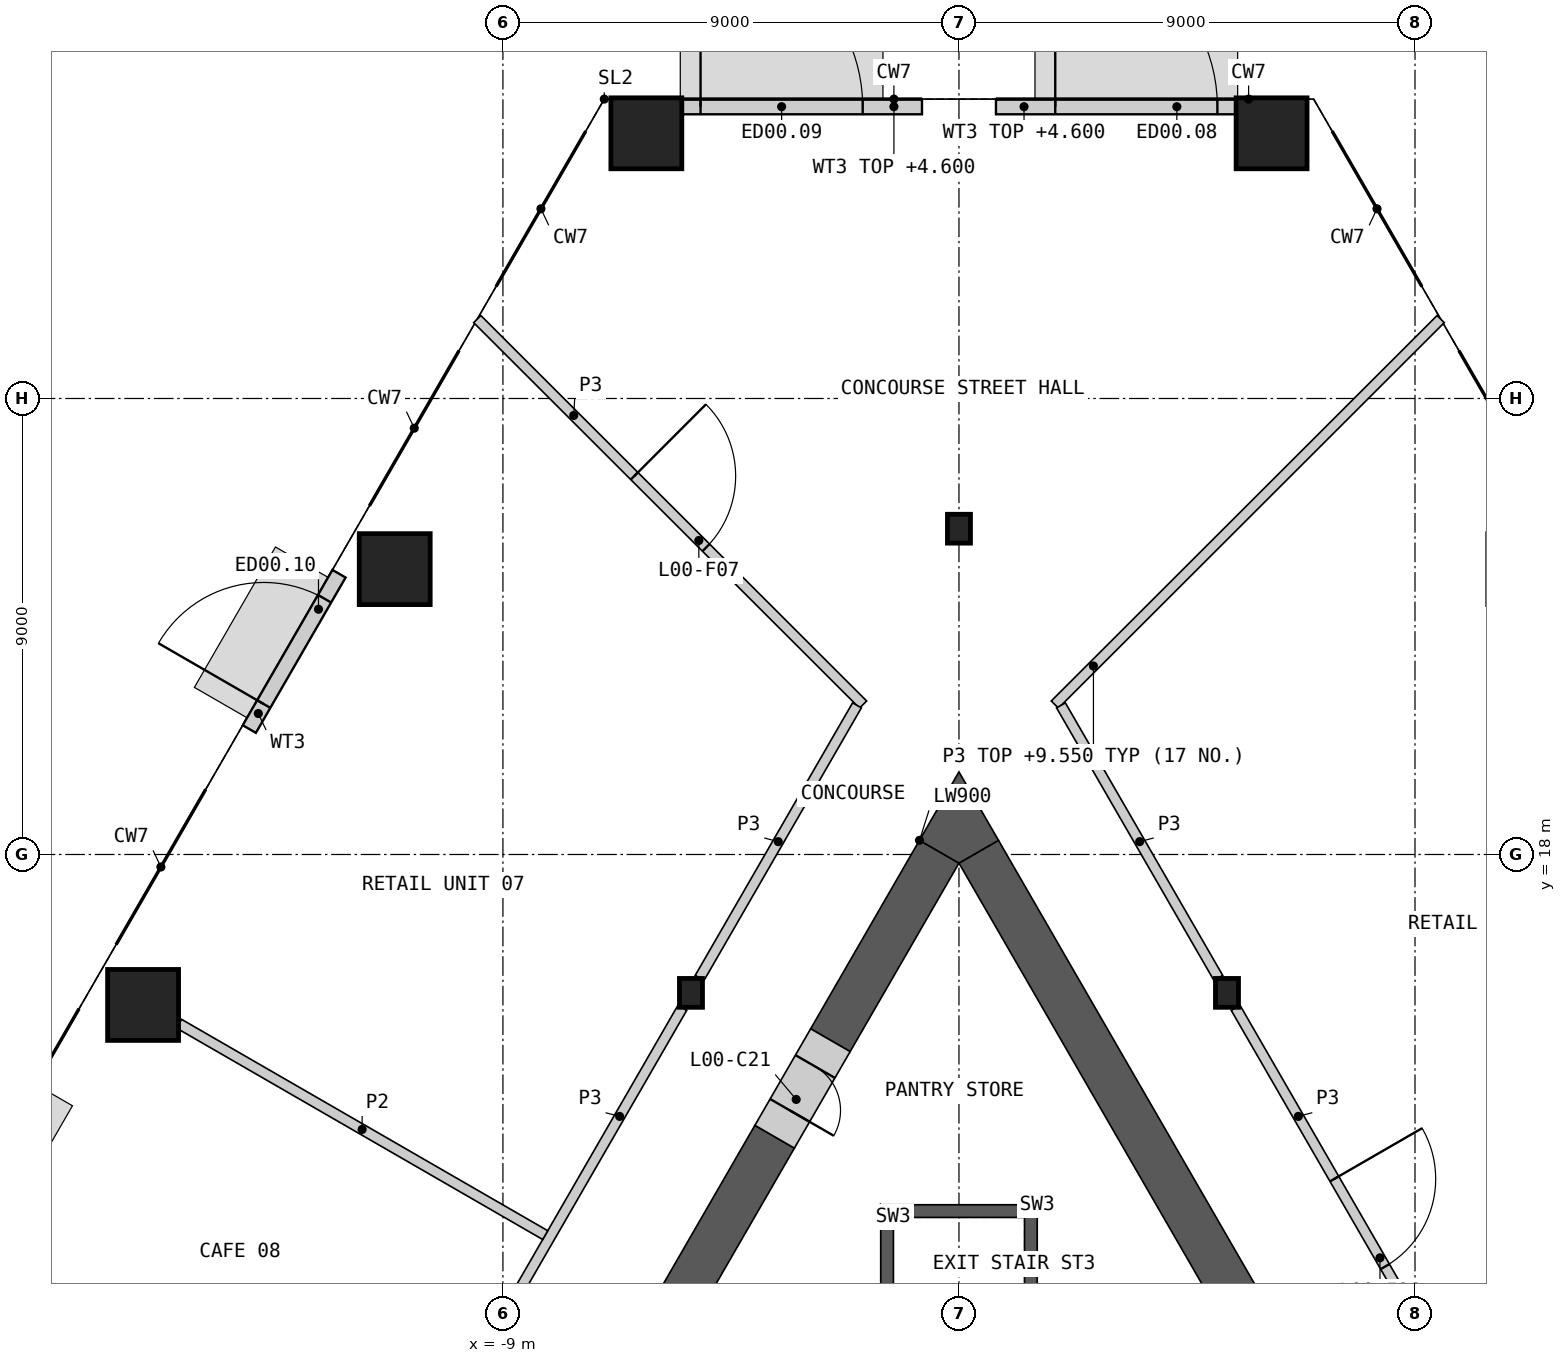
"""IFC4 building model, lengths in metres.
Left out: names, types, materials, properties, quantities, classifications, styles, units other than length and angle.
Written with IfcOpenShell. Run it as: python <this file> out.ifc"""

import sys

from ifc_helpers import new_model, si_unit, direction, frame, frame_2d, origin, origin_2d, place, context, subcontext, project, spatial, polyline, rectangle, hollow_rectangle, i_section, outline, extrude, element, fill, save


model = new_model("IFC4")
c1 = context("Model", 3, precision=1e-05, world=origin(), true_north=direction((0.0, 1.0)))
c2 = subcontext(c1, "Body", "Model", "MODEL_VIEW")
j1 = project(units=[si_unit("LENGTHUNIT", "METRE"), si_unit("PLANEANGLEUNIT", "RADIAN")], contexts=[c1])
p1 = place(None, origin())
s1 = spatial("IfcSite", under=j1, at=p1, CompositionType="ELEMENT")
p2 = place(p1, origin())
s2 = spatial("IfcBuilding", under=s1, at=p2, CompositionType="ELEMENT")
p3 = place(p2, origin())
s3 = spatial("IfcBuildingStorey", under=s2, at=p3, CompositionType="ELEMENT", Elevation=0.0)
for number, where, z_axis, x_axis in (
    (1, (6.17, 32.234, 0.0), (0.0, 0.0, 1.0), (1.0, 0.0, 0.0)),
    (2, (-6.17, 32.234, 0.0), (0.0, 0.0, 1.0), (1.0, 0.0, 0.0)),
    (3, (-11.136, 23.632, 0.0), (0.0, 0.0, 1.0), (1.0, 0.0, 0.0)),
    (4, (-16.102, 15.031, 0.0), (0.0, 0.0, 1.0), (1.0, 0.0, 0.0)),
):
    element("IfcColumn", number, at=place(p3, frame(where, z_axis=z_axis, x_axis=x_axis)), inside=s3, PredefinedType="COLUMN", context=c2, shape_type="SweptSolid", body=[
        extrude(hollow_rectangle(XDim=1.4, YDim=1.4, WallThickness=0.1, at=origin_2d()), origin(), (0.0, 0.0, 1.0), 10.0),
    ])
for number, where, z_axis, x_axis in (
    (5, (0.0, 24.43, 0.0), (0.0, 0.0, 1.0), (1.0, 0.0, 0.0)),
    (6, (-5.289, 15.269, 0.0), (0.0, 0.0, 1.0), (1.0, 0.0, 0.0)),
    (7, (5.289, 15.269, 0.0), (0.0, 0.0, 1.0), (1.0, 0.0, 0.0)),
):
    element("IfcColumn", number, at=place(p3, frame(where, z_axis=z_axis, x_axis=x_axis)), inside=s3, PredefinedType="COLUMN", context=c2, shape_type="SweptSolid", body=[
        extrude(i_section(OverallWidth=0.454, OverallDepth=0.57, WebThickness=0.078, FlangeThickness=0.125, at=origin_2d()), origin(), (0.0, 0.0, 1.0), 10.0),
    ])
p4 = place(p3, frame((0.73, 32.759, 0.0), z_axis=(0.0, 0.0, 1.0), x_axis=(1.0, 0.0, 0.0)))
e8 = element("IfcWall", 8, at=p4, inside=s3, PredefinedType="SOLIDWALL", context=c2, shape_type="SweptSolid", body=[
    extrude(rectangle(XDim=5.54, YDim=0.3, at=frame_2d((2.77, 0.0))), origin(), (0.0, 0.0, 1.0), 4.6),
])
p5 = place(p4, frame((1.17, 0.0, 0.0)))
e9 = element("IfcOpeningElement", 9, at=p5, cuts=e8, PredefinedType="OPENING", context=c2, shape_type="SweptSolid", body=[
    extrude(rectangle(XDim=3.2, YDim=4.0, at=frame_2d((1.6, 2.0))), frame((0.0, 0.16, 0.0), z_axis=(0.0, -1.0, 0.0), x_axis=(1.0, 0.0, 0.0)), (0.0, 0.0, 1.0), 0.32),
])
p6 = place(p3, frame((-6.27, 32.759, 0.0), z_axis=(0.0, 0.0, 1.0), x_axis=(1.0, 0.0, 0.0)))
e10 = element("IfcWall", 10, at=p6, inside=s3, PredefinedType="SOLIDWALL", context=c2, shape_type="SweptSolid", body=[
    extrude(rectangle(XDim=5.54, YDim=0.3, at=frame_2d((2.77, 0.0))), origin(), (0.0, 0.0, 1.0), 4.6),
])
p7 = place(p6, frame((1.17, 0.0, 0.0)))
e11 = element("IfcOpeningElement", 11, at=p7, cuts=e10, PredefinedType="OPENING", context=c2, shape_type="SweptSolid", body=[
    extrude(rectangle(XDim=3.2, YDim=4.0, at=frame_2d((1.6, 2.0))), frame((0.0, 0.16, 0.0), z_axis=(0.0, -1.0, 0.0), x_axis=(1.0, 0.0, 0.0)), (0.0, 0.0, 1.0), 0.32),
])
p8 = place(p3, frame((-14.005, 20.476, 0.0), z_axis=(0.0, 0.0, 1.0), x_axis=(0.500011000363, 0.866019052629, 0.0)))
e12 = element("IfcWall", 12, at=p8, inside=s3, PredefinedType="SOLIDWALL", context=c2, shape_type="SweptSolid", body=[
    extrude(rectangle(XDim=3.54, YDim=0.3, at=frame_2d((1.77, 0.0))), origin(), (0.0, 0.0, 1.0), 9.55),
])
p9 = place(p8, frame((0.57, 0.0, 0.0)))
e13 = element("IfcOpeningElement", 13, at=p9, cuts=e12, PredefinedType="OPENING", context=c2, shape_type="SweptSolid", body=[
    extrude(rectangle(XDim=2.4, YDim=3.6, at=frame_2d((1.2, 1.8))), frame((0.0, 0.16, 0.0), z_axis=(0.0, -1.0, 0.0), x_axis=(1.0, 0.0, 0.0)), (0.0, 0.0, 1.0), 0.32),
])
p10 = place(p3, origin())
e14 = element("IfcWall", 14, at=p10, inside=s3, PredefinedType="SHEAR", context=c2, shape_type="SweptSolid", body=[
    extrude(outline(polyline([(1.544, 5.237), (1.544, 11.087), (1.294, 10.837), (1.294, 5.237), (1.544, 5.237)])), origin(), (0.0, 0.0, 1.0), 9.55),
])
p11 = place(p3, origin())
e15 = element("IfcWall", 15, at=p11, inside=s3, PredefinedType="SHEAR", context=c2, shape_type="SweptSolid", body=[
    extrude(outline(polyline([(1.544, 11.087), (-1.544, 11.087), (-1.294, 10.837), (1.294, 10.837), (1.544, 11.087)])), origin(), (0.0, 0.0, 1.0), 9.55),
])
p12 = place(p3, origin())
e16 = element("IfcWall", 16, at=p12, inside=s3, PredefinedType="SHEAR", context=c2, shape_type="SweptSolid", body=[
    extrude(outline(polyline([(-1.294, 10.837), (-1.544, 11.087), (-1.544, 5.237), (-1.294, 5.237), (-1.294, 10.837)])), origin(), (0.0, 0.0, 1.0), 9.55),
])
p13 = place(p3, frame((5.91, 8.493, 0.0), z_axis=(0.0, 0.0, 1.0), x_axis=(-0.50000828114, 0.866020622613, 0.0)))
e17 = element("IfcWall", 17, at=p13, inside=s3, PredefinedType="SHEAR", context=c2, shape_type="SweptSolid", body=[
    extrude(rectangle(XDim=11.041, YDim=0.9, at=frame_2d((5.521, 0.0))), origin(), (0.0, 0.0, 1.0), 9.55),
])
p14 = place(p3, frame((-3.637, 12.43, 0.0), z_axis=(0.0, 0.0, 1.0), x_axis=(-0.500011513458, -0.866018756384, 0.0)))
e18 = element("IfcWall", 18, at=p14, inside=s3, PredefinedType="SHEAR", context=c2, shape_type="SweptSolid", body=[
    extrude(rectangle(XDim=9.066, YDim=0.9, at=frame_2d((4.533, 0.0))), origin(), (0.0, 0.0, 1.0), 9.55),
])
p15 = place(p3, frame((-0.39, 18.055, 0.0), z_axis=(0.0, 0.0, 1.0), x_axis=(-0.500014347272, -0.866017120224, 0.0)))
e19 = element("IfcWall", 19, at=p15, inside=s3, PredefinedType="SHEAR", context=c2, shape_type="SweptSolid", body=[
    extrude(rectangle(XDim=4.296, YDim=0.9, at=frame_2d((2.148, 0.0))), origin(), (0.0, 0.0, 1.0), 9.55),
])
p16 = place(p3, origin())
e20 = element("IfcWall", 20, at=p16, inside=s3, PredefinedType="SHEAR", context=c2, shape_type="SweptSolid", body=[
    extrude(outline(polyline([(-0.779, 18.28), (0.0, 19.63), (0.779, 18.28), (0.0, 17.83), (-0.779, 18.28)])), origin(), (0.0, 0.0, 1.0), 9.55),
])
p17 = place(p3, frame((-2.538, 14.335, 0.0), z_axis=(0.0, 0.0, 1.0), x_axis=(-0.499994660107, -0.866028486751, 0.0)))
e21 = element("IfcWall", 21, at=p17, inside=s3, PredefinedType="SHEAR", context=c2, shape_type="SweptSolid", body=[
    extrude(rectangle(XDim=2.2, YDim=0.9, at=frame_2d((1.1, 0.0))), origin(), (0.0, 0.0, 1.0), 9.55),
])
p18 = place(p17, frame((0.6, 0.0, 0.0)))
e22 = element("IfcOpeningElement", 22, at=p18, cuts=e21, PredefinedType="OPENING", context=c2, shape_type="SweptSolid", body=[
    extrude(rectangle(XDim=1.0, YDim=2.1, at=frame_2d((0.5, 1.05))), frame((0.0, 0.46, 0.0), z_axis=(0.0, -1.0, 0.0), x_axis=(1.0, 0.0, 0.0)), (0.0, 0.0, 1.0), 0.92),
])
p19 = place(p3, frame((1.892, 20.959, 0.0), z_axis=(0.0, 0.0, 1.0), x_axis=(0.707390242945, 0.706823205749, 0.0)))
e23 = element("IfcWall", 23, at=p19, inside=s3, PredefinedType="PARTITIONING", context=c2, shape_type="SweptSolid", body=[
    extrude(rectangle(XDim=10.764, YDim=0.2, at=frame_2d((5.382, 0.0))), origin(), (0.0, 0.0, 1.0), 9.55),
])
p20 = place(p3, frame((-9.507, 28.567, 0.0), z_axis=(0.0, 0.0, 1.0), x_axis=(0.707390242945, -0.706823205749, 0.0)))
e24 = element("IfcWall", 24, at=p20, inside=s3, PredefinedType="PARTITIONING", context=c2, shape_type="SweptSolid", body=[
    extrude(rectangle(XDim=10.764, YDim=0.2, at=frame_2d((5.382, 0.0))), origin(), (0.0, 0.0, 1.0), 9.55),
])
p21 = place(p20, frame((4.382, 0.0, 0.0)))
e25 = element("IfcOpeningElement", 25, at=p21, cuts=e24, PredefinedType="OPENING", context=c2, shape_type="SweptSolid", body=[
    extrude(rectangle(XDim=2.0, YDim=2.1, at=frame_2d((1.0, 1.05))), frame((0.0, 0.11, 0.0), z_axis=(0.0, -1.0, 0.0), x_axis=(1.0, 0.0, 0.0)), (0.0, 0.0, 1.0), 0.22),
])
p22 = place(p3, frame((5.459, 14.974, 0.0), z_axis=(0.0, 0.0, 1.0), x_axis=(0.499985793049, -0.866033606016, 0.0)))
e26 = element("IfcWall", 26, at=p22, inside=s3, PredefinedType="PARTITIONING", context=c2, shape_type="SweptSolid", body=[
    extrude(rectangle(XDim=9.898, YDim=0.2, at=frame_2d((4.949, 0.0))), origin(), (0.0, 0.0, 1.0), 9.55),
])
p23 = place(p22, frame((3.898, 0.0, 0.0)))
e27 = element("IfcOpeningElement", 27, at=p23, cuts=e26, PredefinedType="OPENING", context=c2, shape_type="SweptSolid", body=[
    extrude(rectangle(XDim=2.0, YDim=2.1, at=frame_2d((1.0, 1.05))), frame((0.0, 0.11, 0.0), z_axis=(0.0, -1.0, 0.0), x_axis=(1.0, 0.0, 0.0)), (0.0, 0.0, 1.0), 0.22),
])
p24 = place(p3, frame((-10.408, 6.402, 0.0), z_axis=(0.0, 0.0, 1.0), x_axis=(0.499985793049, 0.866033606016, 0.0)))
e28 = element("IfcWall", 28, at=p24, inside=s3, PredefinedType="PARTITIONING", context=c2, shape_type="SweptSolid", body=[
    extrude(rectangle(XDim=9.898, YDim=0.2, at=frame_2d((4.949, 0.0))), origin(), (0.0, 0.0, 1.0), 9.55),
])
p25 = place(p24, frame((1.869, 0.0, 0.0)))
e29 = element("IfcOpeningElement", 29, at=p25, cuts=e28, PredefinedType="OPENING", context=c2, shape_type="SweptSolid", body=[
    extrude(rectangle(XDim=1.0, YDim=2.1, at=frame_2d((0.5, 1.05))), frame((0.0, 0.11, 0.0), z_axis=(0.0, -1.0, 0.0), x_axis=(1.0, 0.0, 0.0)), (0.0, 0.0, 1.0), 0.22),
])
for number, where, z_axis, x_axis in (
    (30, (-5.119, 15.563, 0.0), (0.0, 0.0, 1.0), (0.5, 0.866, 0.0)),
    (31, (2.013, 20.943, 0.0), (0.0, 0.0, 1.0), (0.5, -0.866, 0.0)),
):
    element("IfcWall", number, at=place(p3, frame(where, z_axis=z_axis, x_axis=x_axis)), inside=s3, PredefinedType="PARTITIONING", context=c2, shape_type="SweptSolid", body=[
        extrude(rectangle(XDim=6.212, YDim=0.2, at=frame_2d((3.106, 0.0))), origin(), (0.0, 0.0, 1.0), 9.55),
    ])
p26 = place(p3, frame((-15.392, 14.66, 0.0), z_axis=(0.0, 0.0, 1.0), x_axis=(0.866027244746, -0.499996811348, 0.0)))
e32 = element("IfcWall", 32, at=p26, inside=s3, PredefinedType="PARTITIONING", context=c2, shape_type="SweptSolid", body=[
    extrude(rectangle(XDim=8.345, YDim=0.2, at=frame_2d((4.172, 0.0))), origin(), (0.0, 0.0, 1.0), 9.55),
])
p27 = place(p3, frame((-20.109, 9.763, 0.0), z_axis=(0.0, 0.0, 1.0), x_axis=(0.866017364883, -0.500013923527, 0.0)))
e33 = element("IfcWall", 33, at=p27, inside=s3, PredefinedType="PARTITIONING", context=c2, shape_type="SweptSolid", body=[
    extrude(rectangle(XDim=9.982, YDim=0.2, at=frame_2d((4.991, 0.0))), origin(), (0.0, 0.0, 1.0), 9.55),
])
p28 = place(p5, origin())
e34 = element("IfcDoor", 34, at=p28, inside=s3, OperationType="DOUBLE_DOOR_DOUBLE_SWING", PredefinedType="DOOR", context=c2, shape_type="SweptSolid", body=[
    extrude(rectangle(XDim=3.2, YDim=4.0, at=frame_2d((1.6, 2.0))), frame((0.0, 0.025, 0.0), z_axis=(0.0, -1.0, 0.0), x_axis=(1.0, 0.0, 0.0)), (0.0, 0.0, 1.0), 0.05),
])
fill(e9, e34)
p29 = place(p7, origin())
e35 = element("IfcDoor", 35, at=p29, inside=s3, OperationType="DOUBLE_DOOR_DOUBLE_SWING", PredefinedType="DOOR", context=c2, shape_type="SweptSolid", body=[
    extrude(rectangle(XDim=3.2, YDim=4.0, at=frame_2d((1.6, 2.0))), frame((0.0, 0.025, 0.0), z_axis=(0.0, -1.0, 0.0), x_axis=(1.0, 0.0, 0.0)), (0.0, 0.0, 1.0), 0.05),
])
fill(e11, e35)
p30 = place(p9, origin())
e36 = element("IfcDoor", 36, at=p30, inside=s3, OperationType="DOUBLE_DOOR_SINGLE_SWING", PredefinedType="DOOR", context=c2, shape_type="SweptSolid", body=[
    extrude(rectangle(XDim=2.4, YDim=3.6, at=frame_2d((1.2, 1.8))), frame((0.0, 0.025, 0.0), z_axis=(0.0, -1.0, 0.0), x_axis=(1.0, 0.0, 0.0)), (0.0, 0.0, 1.0), 0.05),
])
fill(e13, e36)
p31 = place(p18, origin())
e37 = element("IfcDoor", 37, at=p31, inside=s3, OperationType="SINGLE_SWING_RIGHT", PredefinedType="DOOR", context=c2, shape_type="SweptSolid", body=[
    extrude(rectangle(XDim=1.0, YDim=2.1, at=frame_2d((0.5, 1.05))), frame((0.0, 0.205, 0.0), z_axis=(0.0, -1.0, 0.0), x_axis=(1.0, 0.0, 0.0)), (0.0, 0.0, 1.0), 0.05),
])
fill(e22, e37)
p32 = place(p23, origin())
e38 = element("IfcDoor", 38, at=p32, inside=s3, OperationType="DOUBLE_DOOR_SINGLE_SWING", PredefinedType="DOOR", context=c2, shape_type="SweptSolid", body=[
    extrude(rectangle(XDim=2.0, YDim=2.1, at=frame_2d((1.0, 1.05))), frame((0.0, 0.025, 0.0), z_axis=(0.0, -1.0, 0.0), x_axis=(1.0, 0.0, 0.0)), (0.0, 0.0, 1.0), 0.05),
])
fill(e27, e38)
p33 = place(p21, origin())
e39 = element("IfcDoor", 39, at=p33, inside=s3, OperationType="DOUBLE_DOOR_SINGLE_SWING", PredefinedType="DOOR", context=c2, shape_type="SweptSolid", body=[
    extrude(rectangle(XDim=2.0, YDim=2.1, at=frame_2d((1.0, 1.05))), frame((0.0, 0.025, 0.0), z_axis=(0.0, -1.0, 0.0), x_axis=(1.0, 0.0, 0.0)), (0.0, 0.0, 1.0), 0.05),
])
fill(e25, e39)
save(model, sys.argv[1])
